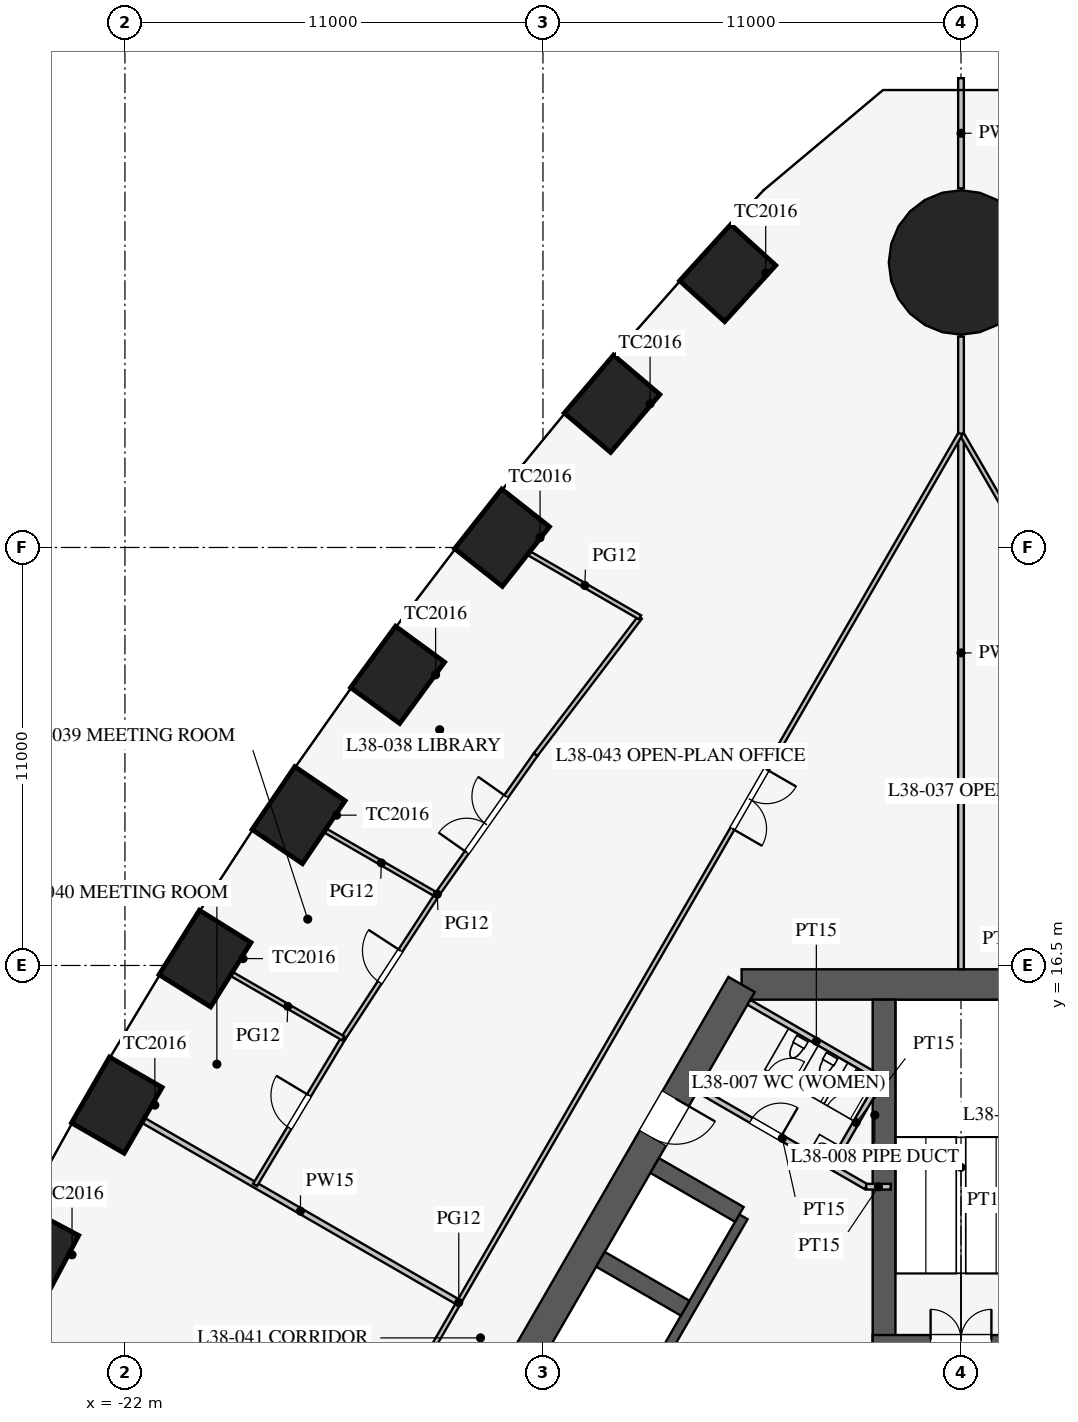
"""IFC4 building model, lengths in metres.
Left out: names, types, materials, properties, quantities, classifications, styles, units other than length and angle.
Written with IfcOpenShell. Run it as: python <this file> out.ifc"""

import sys

from ifc_helpers import new_model, si_unit, direction, frame, frame_2d, origin, origin_2d, place, context, subcontext, project, spatial, rectangle, circle, extrude, element, fill, save


model = new_model("IFC4")
c1 = context("Model", 3, precision=1e-05, world=origin(), true_north=direction((0.0, 1.0)))
c2 = subcontext(c1, "Body", "Model", "MODEL_VIEW")
j1 = project(units=[si_unit("LENGTHUNIT", "METRE"), si_unit("PLANEANGLEUNIT", "RADIAN")], contexts=[c1])
p1 = place(None, origin())
s1 = spatial("IfcSite", under=j1, at=p1, CompositionType="ELEMENT")
p2 = place(p1, origin())
s2 = spatial("IfcBuilding", under=s1, at=p2, CompositionType="ELEMENT")
p3 = place(p2, frame((0.0, 0.0, 166.1)))
s3 = spatial("IfcBuildingStorey", under=s2, at=p3, CompositionType="ELEMENT", Elevation=166.1)
for number, where, z_axis, x_axis in (
    (1, (-6.139, 34.721, 0.0), (0.0, 0.0, 1.0), (-0.672, -0.74, 0.0)),
    (2, (-9.182, 31.282, 0.0), (0.0, 0.0, 1.0), (-0.648, -0.762, 0.0)),
    (3, (-12.077, 27.757, 0.0), (0.0, 0.0, 1.0), (-0.62, -0.785, 0.0)),
    (4, (-14.825, 24.148, 0.0), (0.0, 0.0, 1.0), (-0.591, -0.807, 0.0)),
    (5, (-17.43, 20.456, 0.0), (0.0, 0.0, 1.0), (-0.561, -0.828, 0.0)),
    (6, (-19.893, 16.681, 0.0), (0.0, 0.0, 1.0), (-0.531, -0.847, 0.0)),
    (7, (-22.213, 12.825, 0.0), (0.0, 0.0, 1.0), (-0.5, -0.866, 0.0)),
    (8, (-24.393, 8.887, 0.0), (0.0, 0.0, 1.0), (-0.468, -0.883, 0.0)),
):
    element("IfcColumn", number, at=place(p3, frame(where, z_axis=z_axis, x_axis=x_axis)), inside=s3, PredefinedType="COLUMN", context=c2, shape_type="SweptSolid", body=[
        extrude(rectangle(XDim=2.0, YDim=1.6, at=origin_2d()), origin(), (0.0, 0.0, 1.0), 4.2),
    ])
p4 = place(p3, frame((0.0, 35.0, 0.0), z_axis=(0.0, 0.0, 1.0), x_axis=(1.0, 0.0, 0.0)))
e9 = element("IfcColumn", 9, at=p4, inside=s3, PredefinedType="COLUMN", context=c2, shape_type="SweptSolid", body=[
    extrude(circle(Radius=1.9, at=origin_2d()), origin(), (0.0, 0.0, 1.0), 4.2),
])
p5 = place(p3, frame((5.773, 16.0, 0.0), z_axis=(0.0, 0.0, 1.0), x_axis=(-1.0, 0.0, 0.0)))
e10 = element("IfcWall", 10, at=p5, inside=s3, PredefinedType="SHEAR", context=c2, shape_type="SweptSolid", body=[
    extrude(rectangle(XDim=11.547, YDim=0.8, at=frame_2d((5.773, 0.0))), origin(), (0.0, 0.0, 1.0), 4.2),
])
p6 = place(p3, frame((-5.773, 16.0, 0.0), z_axis=(0.0, 0.0, 1.0), x_axis=(-0.500002442456, -0.866023993627, 0.0)))
e11 = element("IfcWall", 11, at=p6, inside=s3, PredefinedType="SHEAR", context=c2, shape_type="SweptSolid", body=[
    extrude(rectangle(XDim=21.939, YDim=0.8, at=frame_2d((10.97, 0.0))), origin(), (0.0, 0.0, 1.0), 4.2),
])
p7 = place(p6, frame((17.27, 0.0, 0.0)))
e12 = element("IfcOpeningElement", 12, at=p7, cuts=e11, PredefinedType="OPENING", context=c2, shape_type="SweptSolid", body=[
    extrude(rectangle(XDim=1.2, YDim=2.1, at=frame_2d((0.6, 1.05))), frame((0.0, 0.41, 0.0), z_axis=(0.0, -1.0, 0.0), x_axis=(1.0, 0.0, 0.0)), (0.0, 0.0, 1.0), 0.82),
])
p8 = place(p6, frame((3.47, 0.0, 0.0)))
e13 = element("IfcOpeningElement", 13, at=p8, cuts=e11, PredefinedType="OPENING", context=c2, shape_type="SweptSolid", body=[
    extrude(rectangle(XDim=1.2, YDim=2.1, at=frame_2d((0.6, 1.05))), frame((0.0, 0.41, 0.0), z_axis=(0.0, -1.0, 0.0), x_axis=(1.0, 0.0, 0.0)), (0.0, 0.0, 1.0), 0.82),
])
p9 = place(p3, frame((-5.724, 9.886, 0.0), z_axis=(0.0, 0.0, 1.0), x_axis=(-0.500001763848, -0.866024385424, 0.0)))
e14 = element("IfcWall", 14, at=p9, inside=s3, PredefinedType="SHEAR", context=c2, shape_type="SweptSolid", body=[
    extrude(rectangle(XDim=11.4, YDim=0.25, at=frame_2d((5.7, 0.0))), origin(), (0.0, 0.0, 1.0), 4.2),
])
p10 = place(p9, frame((6.525, 0.0, 0.0)))
e15 = element("IfcOpeningElement", 15, at=p10, cuts=e14, PredefinedType="OPENING", context=c2, shape_type="SweptSolid", body=[
    extrude(rectangle(XDim=1.2, YDim=2.2, at=frame_2d((0.6, 1.1))), frame((0.0, 0.135, 0.0), z_axis=(0.0, -1.0, 0.0), x_axis=(1.0, 0.0, 0.0)), (0.0, 0.0, 1.0), 0.27),
])
p11 = place(p9, frame((9.375, 0.0, 0.0)))
e16 = element("IfcOpeningElement", 16, at=p11, cuts=e14, PredefinedType="OPENING", context=c2, shape_type="SweptSolid", body=[
    extrude(rectangle(XDim=1.2, YDim=2.2, at=frame_2d((0.6, 1.1))), frame((0.0, 0.135, 0.0), z_axis=(0.0, -1.0, 0.0), x_axis=(1.0, 0.0, 0.0)), (0.0, 0.0, 1.0), 0.27),
])
p12 = place(p3, frame((-5.832, 9.949, 0.0), z_axis=(0.0, 0.0, 1.0), x_axis=(-0.866029291668, 0.499993265928, 0.0)))
e17 = element("IfcWall", 17, at=p12, inside=s3, PredefinedType="SHEAR", context=c2, shape_type="SweptSolid", body=[
    extrude(rectangle(XDim=2.575, YDim=0.45, at=frame_2d((1.288, 0.0))), origin(), (0.0, 0.0, 1.0), 4.2),
])
p13 = place(p3, frame((-7.257, 7.481, 0.0), z_axis=(0.0, 0.0, 1.0), x_axis=(-0.866046643894, 0.499963209246, 0.0)))
e18 = element("IfcWall", 18, at=p13, inside=s3, PredefinedType="SHEAR", context=c2, shape_type="SweptSolid", body=[
    extrude(rectangle(XDim=2.575, YDim=0.45, at=frame_2d((1.288, 0.0))), origin(), (0.0, 0.0, 1.0), 4.2),
])
p14 = place(p3, frame((-2.025, 6.525, 0.0), z_axis=(0.0, 0.0, 1.0), x_axis=(0.0, 1.0, 0.0)))
e19 = element("IfcWall", 19, at=p14, inside=s3, PredefinedType="SHEAR", context=c2, shape_type="SweptSolid", body=[
    extrude(rectangle(XDim=9.075, YDim=0.6, at=frame_2d((4.538, 0.0))), origin(), (0.0, 0.0, 1.0), 4.2),
])
p15 = place(p3, frame((2.325, 6.65, 0.0), z_axis=(0.0, 0.0, 1.0), x_axis=(-1.0, 0.0, 0.0)))
e20 = element("IfcWall", 20, at=p15, inside=s3, PredefinedType="SHEAR", context=c2, shape_type="SweptSolid", body=[
    extrude(rectangle(XDim=4.65, YDim=0.25, at=frame_2d((2.325, 0.0))), origin(), (0.0, 0.0, 1.0), 4.2),
])
p16 = place(p15, frame((1.525, 0.0, 0.0)))
e21 = element("IfcOpeningElement", 21, at=p16, cuts=e20, PredefinedType="OPENING", context=c2, shape_type="SweptSolid", body=[
    extrude(rectangle(XDim=1.6, YDim=2.1, at=frame_2d((0.8, 1.05))), frame((0.0, 0.135, 0.0), z_axis=(0.0, -1.0, 0.0), x_axis=(1.0, 0.0, 0.0)), (0.0, 0.0, 1.0), 0.27),
])
p17 = place(p3, frame((-2.495, 10.678, 0.0), z_axis=(0.0, 0.0, 1.0), x_axis=(-0.86602216432, 0.500005610874, 0.0)))
e22 = element("IfcWall", 22, at=p17, inside=s3, PredefinedType="PARTITIONING", context=c2, shape_type="SweptSolid", body=[
    extrude(rectangle(XDim=5.1, YDim=0.15, at=frame_2d((2.55, 0.0))), origin(), (0.0, 0.0, 1.0), 4.0),
])
p18 = place(p17, frame((2.6, 0.0, 0.0)))
e23 = element("IfcOpeningElement", 23, at=p18, cuts=e22, PredefinedType="OPENING", context=c2, shape_type="SweptSolid", body=[
    extrude(rectangle(XDim=0.9, YDim=2.1, at=frame_2d((0.45, 1.05))), frame((0.0, 0.085, 0.0), z_axis=(0.0, -1.0, 0.0), x_axis=(1.0, 0.0, 0.0)), (0.0, 0.0, 1.0), 0.17),
])
p19 = place(p3, frame((-2.495, 10.678, 0.0), z_axis=(0.0, 0.0, 1.0), x_axis=(1.0, 0.0, 0.0)))
e24 = element("IfcWall", 24, at=p19, inside=s3, PredefinedType="PARTITIONING", context=c2, shape_type="SweptSolid", body=[
    extrude(rectangle(XDim=0.645, YDim=0.15, at=frame_2d((0.323, 0.0))), origin(), (0.0, 0.0, 1.0), 4.0),
])
p20 = place(p3, frame((-2.031, 13.482, 0.0), z_axis=(0.0, 0.0, 1.0), x_axis=(-0.866050731258, 0.499956128963, 0.0)))
e25 = element("IfcWall", 25, at=p20, inside=s3, PredefinedType="PARTITIONING", context=c2, shape_type="SweptSolid", body=[
    extrude(rectangle(XDim=4.1, YDim=0.15, at=frame_2d((2.05, 0.0))), origin(), (0.0, 0.0, 1.0), 4.0),
])
p21 = place(p3, frame((-3.389, 11.281, 0.0), z_axis=(0.0, 0.0, 1.0), x_axis=(0.499989096993, 0.866031698547, 0.0)))
e26 = element("IfcWall", 26, at=p21, inside=s3, PredefinedType="PARTITIONING", context=c2, shape_type="SweptSolid", body=[
    extrude(rectangle(XDim=2.51, YDim=0.15, at=frame_2d((1.255, 0.0))), origin(), (0.0, 0.0, 1.0), 4.0),
])
p22 = place(p3, frame((0.0, 16.4, 0.0), z_axis=(0.0, 0.0, 1.0), x_axis=(0.0, 1.0, 0.0)))
e27 = element("IfcWall", 27, at=p22, inside=s3, PredefinedType="PARTITIONING", context=c2, shape_type="SweptSolid", body=[
    extrude(rectangle(XDim=16.65, YDim=0.15, at=frame_2d((8.325, 0.0))), origin(), (0.0, 0.0, 1.0), 2.3),
])
p23 = place(p3, frame((0.0, 36.95, 0.0), z_axis=(0.0, 0.0, 1.0), x_axis=(0.0, 1.0, 0.0)))
e28 = element("IfcWall", 28, at=p23, inside=s3, PredefinedType="PARTITIONING", context=c2, shape_type="SweptSolid", body=[
    extrude(rectangle(XDim=2.899, YDim=0.15, at=frame_2d((1.45, 0.0))), origin(), (0.0, 0.0, 1.0), 2.3),
])
p24 = place(p3, frame((26.415, -15.231, 0.0), z_axis=(0.0, 0.0, 1.0), x_axis=(-0.50000091641, 0.866024874695, 0.0)))
e29 = element("IfcWall", 29, at=p24, inside=s3, PredefinedType="PARTITIONING", context=c2, shape_type="SweptSolid", body=[
    extrude(rectangle(XDim=52.796, YDim=0.12, at=frame_2d((26.398, 0.0))), origin(), (0.0, 0.0, 1.0), 2.9),
])
p25 = place(p24, frame((10.2, 0.0, 0.15)))
e30 = element("IfcOpeningElement", 30, at=p25, cuts=e29, PredefinedType="OPENING", context=c2, shape_type="SweptSolid", body=[
    extrude(rectangle(XDim=1.8, YDim=2.1, at=frame_2d((0.9, 1.05))), frame((0.0, 0.07, 0.0), z_axis=(0.0, -1.0, 0.0), x_axis=(1.0, 0.0, 0.0)), (0.0, 0.0, 1.0), 0.14),
])
p26 = place(p24, frame((40.8, 0.0, 0.15)))
e31 = element("IfcOpeningElement", 31, at=p26, cuts=e29, PredefinedType="OPENING", context=c2, shape_type="SweptSolid", body=[
    extrude(rectangle(XDim=1.8, YDim=2.1, at=frame_2d((0.9, 1.05))), frame((0.0, 0.07, 0.0), z_axis=(0.0, -1.0, 0.0), x_axis=(1.0, 0.0, 0.0)), (0.0, 0.0, 1.0), 0.14),
])
p27 = place(p3, frame((-13.268, 7.66, 0.0), z_axis=(0.0, 0.0, 1.0), x_axis=(-0.866013963754, 0.500019814191, 0.0)))
e32 = element("IfcWall", 32, at=p27, inside=s3, PredefinedType="PARTITIONING", context=c2, shape_type="SweptSolid", body=[
    extrude(rectangle(XDim=9.5, YDim=0.15, at=frame_2d((4.75, 0.0))), origin(), (0.0, 0.0, 1.0), 2.8),
])
p28 = place(p3, frame((-0.016, 30.491, 0.0), z_axis=(0.0, 0.0, 1.0), x_axis=(-0.50000091641, -0.866024874695, 0.0)))
e33 = element("IfcWall", 33, at=p28, inside=s3, PredefinedType="PARTITIONING", context=c2, shape_type="SweptSolid", body=[
    extrude(rectangle(XDim=52.796, YDim=0.12, at=frame_2d((26.398, 0.0))), origin(), (0.0, 0.0, 1.0), 2.9),
])
p29 = place(p28, frame((10.2, 0.0, 0.15)))
e34 = element("IfcOpeningElement", 34, at=p29, cuts=e33, PredefinedType="OPENING", context=c2, shape_type="SweptSolid", body=[
    extrude(rectangle(XDim=1.8, YDim=2.1, at=frame_2d((0.9, 1.05))), frame((0.0, 0.07, 0.0), z_axis=(0.0, -1.0, 0.0), x_axis=(1.0, 0.0, 0.0)), (0.0, 0.0, 1.0), 0.14),
])
p30 = place(p28, frame((40.8, 0.0, 0.15)))
e35 = element("IfcOpeningElement", 35, at=p30, cuts=e33, PredefinedType="OPENING", context=c2, shape_type="SweptSolid", body=[
    extrude(rectangle(XDim=1.8, YDim=2.1, at=frame_2d((0.9, 1.05))), frame((0.0, 0.07, 0.0), z_axis=(0.0, -1.0, 0.0), x_axis=(1.0, 0.0, 0.0)), (0.0, 0.0, 1.0), 0.14),
])
p31 = place(p3, frame((-11.192, 22.05, 0.0), z_axis=(0.0, 0.0, 1.0), x_axis=(-0.575987178736, -0.817458726745, 0.0)))
e36 = element("IfcWall", 36, at=p31, inside=s3, PredefinedType="PARTITIONING", context=c2, shape_type="SweptSolid", body=[
    extrude(rectangle(XDim=4.518, YDim=0.12, at=frame_2d((2.259, 0.0))), origin(), (0.0, 0.0, 1.0), 2.9),
])
p32 = place(p31, frame((1.35, 0.0, 0.15)))
e37 = element("IfcOpeningElement", 37, at=p32, cuts=e36, PredefinedType="OPENING", context=c2, shape_type="SweptSolid", body=[
    extrude(rectangle(XDim=1.8, YDim=2.1, at=frame_2d((0.9, 1.05))), frame((0.0, 0.07, 0.0), z_axis=(0.0, -1.0, 0.0), x_axis=(1.0, 0.0, 0.0)), (0.0, 0.0, 1.0), 0.14),
])
p33 = place(p3, frame((-8.447, 25.661, 0.0), z_axis=(0.0, 0.0, 1.0), x_axis=(-0.605274299339, -0.796016973789, 0.0)))
e38 = element("IfcWall", 38, at=p33, inside=s3, PredefinedType="PARTITIONING", context=c2, shape_type="SweptSolid", body=[
    extrude(rectangle(XDim=4.536, YDim=0.12, at=frame_2d((2.268, 0.0))), origin(), (0.0, 0.0, 1.0), 2.9),
])
p34 = place(p3, frame((-16.256, 14.581, 0.0), z_axis=(0.0, 0.0, 1.0), x_axis=(-0.515548366618, -0.856860479703, 0.0)))
e39 = element("IfcWall", 39, at=p34, inside=s3, PredefinedType="PARTITIONING", context=c2, shape_type="SweptSolid", body=[
    extrude(rectangle(XDim=4.501, YDim=0.12, at=frame_2d((2.25, 0.0))), origin(), (0.0, 0.0, 1.0), 2.9),
])
p35 = place(p34, frame((1.75, 0.0, 0.15)))
e40 = element("IfcOpeningElement", 40, at=p35, cuts=e39, PredefinedType="OPENING", context=c2, shape_type="SweptSolid", body=[
    extrude(rectangle(XDim=1.0, YDim=2.1, at=frame_2d((0.5, 1.05))), frame((0.0, 0.07, 0.0), z_axis=(0.0, -1.0, 0.0), x_axis=(1.0, 0.0, 0.0)), (0.0, 0.0, 1.0), 0.14),
])
p36 = place(p3, frame((-13.795, 18.357, 0.0), z_axis=(0.0, 0.0, 1.0), x_axis=(-0.546069464151, -0.837739900161, 0.0)))
e41 = element("IfcWall", 41, at=p36, inside=s3, PredefinedType="PARTITIONING", context=c2, shape_type="SweptSolid", body=[
    extrude(rectangle(XDim=4.507, YDim=0.12, at=frame_2d((2.253, 0.0))), origin(), (0.0, 0.0, 1.0), 2.9),
])
p37 = place(p36, frame((1.75, 0.0, 0.15)))
e42 = element("IfcOpeningElement", 42, at=p37, cuts=e41, PredefinedType="OPENING", context=c2, shape_type="SweptSolid", body=[
    extrude(rectangle(XDim=1.0, YDim=2.1, at=frame_2d((0.5, 1.05))), frame((0.0, 0.07, 0.0), z_axis=(0.0, -1.0, 0.0), x_axis=(1.0, 0.0, 0.0)), (0.0, 0.0, 1.0), 0.14),
])
p38 = place(p3, frame((-8.447, 25.661, 0.0), z_axis=(0.0, 0.0, 1.0), x_axis=(-0.866025533106, 0.499999776008, 0.0)))
e43 = element("IfcWall", 43, at=p38, inside=s3, PredefinedType="PARTITIONING", context=c2, shape_type="SweptSolid", body=[
    extrude(rectangle(XDim=3.353, YDim=0.12, at=frame_2d((1.677, 0.0))), origin(), (0.0, 0.0, 1.0), 2.8),
])
p39 = place(p3, frame((-16.256, 14.581, 0.0), z_axis=(0.0, 0.0, 1.0), x_axis=(-0.866022675988, 0.500004724652, 0.0)))
e44 = element("IfcWall", 44, at=p39, inside=s3, PredefinedType="PARTITIONING", context=c2, shape_type="SweptSolid", body=[
    extrude(rectangle(XDim=3.369, YDim=0.12, at=frame_2d((1.685, 0.0))), origin(), (0.0, 0.0, 1.0), 2.8),
])
p40 = place(p3, frame((-13.795, 18.357, 0.0), z_axis=(0.0, 0.0, 1.0), x_axis=(-0.866024928363, 0.500000823453, 0.0)))
e45 = element("IfcWall", 45, at=p40, inside=s3, PredefinedType="PARTITIONING", context=c2, shape_type="SweptSolid", body=[
    extrude(rectangle(XDim=3.366, YDim=0.12, at=frame_2d((1.683, 0.0))), origin(), (0.0, 0.0, 1.0), 2.9),
])
p41 = place(p18, frame((0.9, 0.0, 0.0), z_axis=(0.0, 0.0, 1.0), x_axis=(-1.0, 0.0, 0.0)))
e46 = element("IfcDoor", 46, at=p41, inside=s3, OperationType="SINGLE_SWING_RIGHT", PredefinedType="DOOR", context=c2, shape_type="SweptSolid", body=[
    extrude(rectangle(XDim=0.9, YDim=2.1, at=frame_2d((0.45, 1.05))), frame((0.0, 0.025, 0.0), z_axis=(0.0, -1.0, 0.0), x_axis=(1.0, 0.0, 0.0)), (0.0, 0.0, 1.0), 0.05),
])
fill(e23, e46)
p42 = place(p16, frame((1.6, 0.0, 0.0), z_axis=(0.0, 0.0, 1.0), x_axis=(-1.0, 0.0, 0.0)))
e47 = element("IfcDoor", 47, at=p42, inside=s3, OperationType="DOUBLE_DOOR_SINGLE_SWING", PredefinedType="DOOR", context=c2, shape_type="SweptSolid", body=[
    extrude(rectangle(XDim=1.6, YDim=2.1, at=frame_2d((0.8, 1.05))), frame((0.0, 0.025, 0.0), z_axis=(0.0, -1.0, 0.0), x_axis=(1.0, 0.0, 0.0)), (0.0, 0.0, 1.0), 0.05),
])
fill(e21, e47)
p43 = place(p8, origin())
e48 = element("IfcDoor", 48, at=p43, inside=s3, OperationType="SINGLE_SWING_LEFT", PredefinedType="DOOR", context=c2, shape_type="SweptSolid", body=[
    extrude(rectangle(XDim=1.2, YDim=2.1, at=frame_2d((0.6, 1.05))), frame((0.0, 0.025, 0.0), z_axis=(0.0, -1.0, 0.0), x_axis=(1.0, 0.0, 0.0)), (0.0, 0.0, 1.0), 0.05),
])
fill(e13, e48)
p44 = place(p32, frame((1.8, 0.0, 0.0), z_axis=(0.0, 0.0, 1.0), x_axis=(-1.0, 0.0, 0.0)))
e49 = element("IfcDoor", 49, at=p44, inside=s3, OperationType="DOUBLE_DOOR_SINGLE_SWING", PredefinedType="DOOR", context=c2, shape_type="SweptSolid", body=[
    extrude(rectangle(XDim=1.8, YDim=2.1, at=frame_2d((0.9, 1.05))), frame((0.0, 0.025, 0.0), z_axis=(0.0, -1.0, 0.0), x_axis=(1.0, 0.0, 0.0)), (0.0, 0.0, 1.0), 0.05),
])
fill(e37, e49)
p45 = place(p37, frame((1.0, 0.0, 0.0), z_axis=(0.0, 0.0, 1.0), x_axis=(-1.0, 0.0, 0.0)))
e50 = element("IfcDoor", 50, at=p45, inside=s3, OperationType="SINGLE_SWING_RIGHT", PredefinedType="DOOR", context=c2, shape_type="SweptSolid", body=[
    extrude(rectangle(XDim=1.0, YDim=2.1, at=frame_2d((0.5, 1.05))), frame((0.0, 0.025, 0.0), z_axis=(0.0, -1.0, 0.0), x_axis=(1.0, 0.0, 0.0)), (0.0, 0.0, 1.0), 0.05),
])
fill(e42, e50)
p46 = place(p35, frame((1.0, 0.0, 0.0), z_axis=(0.0, 0.0, 1.0), x_axis=(-1.0, 0.0, 0.0)))
e51 = element("IfcDoor", 51, at=p46, inside=s3, OperationType="SINGLE_SWING_RIGHT", PredefinedType="DOOR", context=c2, shape_type="SweptSolid", body=[
    extrude(rectangle(XDim=1.0, YDim=2.1, at=frame_2d((0.5, 1.05))), frame((0.0, 0.025, 0.0), z_axis=(0.0, -1.0, 0.0), x_axis=(1.0, 0.0, 0.0)), (0.0, 0.0, 1.0), 0.05),
])
fill(e40, e51)
p47 = place(p29, origin())
e52 = element("IfcDoor", 52, at=p47, inside=s3, OperationType="DOUBLE_DOOR_SINGLE_SWING", PredefinedType="DOOR", context=c2, shape_type="SweptSolid", body=[
    extrude(rectangle(XDim=1.8, YDim=2.1, at=frame_2d((0.9, 1.05))), frame((0.0, 0.025, 0.0), z_axis=(0.0, -1.0, 0.0), x_axis=(1.0, 0.0, 0.0)), (0.0, 0.0, 1.0), 0.05),
])
fill(e34, e52)
save(model, sys.argv[1])
